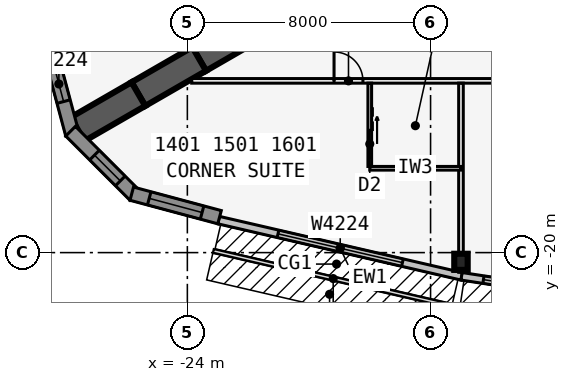
"""IFC4 building model, lengths in metres.
Left out: names, types, materials, properties, quantities, classifications, styles, units other than length and angle.
Written with IfcOpenShell. Run it as: python <this file> out.ifc"""

import sys

from ifc_helpers import new_model, si_unit, direction, frame, frame_2d, origin, origin_2d, place, context, subcontext, project, spatial, polyline, rectangle, i_section, outline, extrude, element, fill, save


model = new_model("IFC4")
c1 = context("Model", 3, precision=1e-05, world=origin(), true_north=direction((0.0, 1.0)))
c2 = subcontext(c1, "Body", "Model", "MODEL_VIEW")
j1 = project(units=[si_unit("LENGTHUNIT", "METRE"), si_unit("PLANEANGLEUNIT", "RADIAN")], contexts=[c1])
p1 = place(None, origin())
s1 = spatial("IfcSite", under=j1, at=p1, CompositionType="ELEMENT")
p2 = place(p1, origin())
s2 = spatial("IfcBuilding", under=s1, at=p2, CompositionType="ELEMENT")
p3 = place(p2, frame((0.0, 0.0, 59.1)))
s3 = spatial("IfcBuildingStorey", under=s2, at=p3, CompositionType="ELEMENT", Elevation=59.1)
for number, where, z_axis, x_axis in (
    (1, (-21.61, -12.477, 0.0), (0.0, 0.0, 1.0), (-0.866, -0.5, 0.0)),
    (2, (-23.61, -13.631, 0.0), (0.0, 0.0, 1.0), (-0.866, -0.5, 0.0)),
    (3, (-25.61, -14.786, 0.0), (0.0, 0.0, 1.0), (-0.866, -0.5, 0.0)),
):
    element("IfcWall", number, at=place(p3, frame(where, z_axis=z_axis, x_axis=x_axis)), inside=s3, PredefinedType="SHEAR", context=c2, shape_type="SweptSolid", body=[
        extrude(rectangle(XDim=2.309, YDim=0.9, at=frame_2d((1.155, 0.0))), origin(), (0.0, 0.0, 1.0), 3.4),
    ])
p4 = place(p3, frame((-15.0, -20.303, 0.0), z_axis=(0.0, 0.0, 1.0), x_axis=(1.0, 0.0, 0.0)))
e4 = element("IfcColumn", 4, at=p4, inside=s3, PredefinedType="COLUMN", context=c2, shape_type="SweptSolid", body=[
    extrude(i_section(OverallWidth=0.442, OverallDepth=0.531, WebThickness=0.066, FlangeThickness=0.106, at=origin_2d()), origin(), (0.0, 0.0, 1.0), 3.4),
])
p5 = place(p3, frame((-22.972, -18.931, 0.0), z_axis=(0.0, 0.0, 1.0), x_axis=(0.974279327392, -0.225343720163, 0.0)))
e5 = element("IfcWall", 5, at=p5, inside=s3, PredefinedType="STANDARD", context=c2, shape_type="SweptSolid", body=[
    extrude(rectangle(XDim=8.211, YDim=0.25, at=frame_2d((4.105, 0.0))), origin(), (0.0, 0.0, 1.0), 3.235),
])
p6 = place(p5, frame((2.006, 0.0, 0.45)))
e6 = element("IfcOpeningElement", 6, at=p6, cuts=e5, PredefinedType="OPENING", context=c2, shape_type="SweptSolid", body=[
    extrude(rectangle(XDim=4.2, YDim=2.4, at=frame_2d((2.1, 1.2))), frame((0.0, 0.135, 0.0), z_axis=(0.0, -1.0, 0.0), x_axis=(1.0, 0.0, 0.0)), (0.0, 0.0, 1.0), 0.27),
])
p7 = place(p3, frame((-14.981, -20.779, 0.0), z_axis=(0.0, 0.0, 1.0), x_axis=(0.988615403399, -0.150464561152, 0.0)))
e7 = element("IfcWall", 7, at=p7, inside=s3, PredefinedType="STANDARD", context=c2, shape_type="SweptSolid", body=[
    extrude(rectangle(XDim=5.058, YDim=0.25, at=frame_2d((2.529, 0.0))), origin(), (0.0, 0.0, 1.0), 3.235),
])
p8 = place(p7, frame((0.729, 0.0, 0.45)))
e8 = element("IfcOpeningElement", 8, at=p8, cuts=e7, PredefinedType="OPENING", context=c2, shape_type="SweptSolid", body=[
    extrude(rectangle(XDim=3.6, YDim=2.4, at=frame_2d((1.8, 1.2))), frame((0.0, 0.135, 0.0), z_axis=(0.0, -1.0, 0.0), x_axis=(1.0, 0.0, 0.0)), (0.0, 0.0, 1.0), 0.27),
])
p9 = place(p3, frame((-28.556, -13.221, 0.0), z_axis=(0.0, 0.0, 1.0), x_axis=(0.258801419081, -0.965930548995, 0.0)))
e9 = element("IfcWall", 9, at=p9, inside=s3, PredefinedType="SOLIDWALL", context=c2, shape_type="SweptSolid", body=[
    extrude(outline(polyline([(2.989, 0.225), (2.929, 0.225), (2.437, 0.093), (2.402, 0.225), (0.0, 0.225), (0.0, -0.225), (2.989, -0.225), (2.989, 0.225)])), origin(), (0.0, 0.0, 1.0), 3.235),
])
p10 = place(p9, frame((0.676, 0.0, 0.45)))
e10 = element("IfcOpeningElement", 10, at=p10, cuts=e9, PredefinedType="OPENING", context=c2, shape_type="SweptSolid", body=[
    extrude(rectangle(XDim=1.2, YDim=2.4, at=frame_2d((0.6, 1.2))), frame((0.0, 0.235, 0.0), z_axis=(0.0, -1.0, 0.0), x_axis=(1.0, 0.0, 0.0)), (0.0, 0.0, 1.0), 0.47),
])
p11 = place(p3, frame((-27.841, -16.007, 0.0), z_axis=(0.0, 0.0, 1.0), x_axis=(0.707025086683, -0.707188466253, 0.0)))
e11 = element("IfcWall", 11, at=p11, inside=s3, PredefinedType="SOLIDWALL", context=c2, shape_type="SweptSolid", body=[
    extrude(outline(polyline([(2.989, 0.225), (0.586, 0.225), (0.551, 0.093), (0.059, 0.225), (0.0, 0.225), (0.0, -0.225), (2.989, -0.225), (2.989, 0.225)])), origin(), (0.0, 0.0, 1.0), 3.235),
])
p12 = place(p11, frame((1.113, 0.0, 0.45)))
e12 = element("IfcOpeningElement", 12, at=p12, cuts=e11, PredefinedType="OPENING", context=c2, shape_type="SweptSolid", body=[
    extrude(rectangle(XDim=1.2, YDim=2.4, at=frame_2d((0.6, 1.2))), frame((0.0, 0.235, 0.0), z_axis=(0.0, -1.0, 0.0), x_axis=(1.0, 0.0, 0.0)), (0.0, 0.0, 1.0), 0.47),
])
p13 = place(p3, frame((-25.829, -18.062, 0.0), z_axis=(0.0, 0.0, 1.0), x_axis=(0.965930548995, -0.258801419081, 0.0)))
e13 = element("IfcWall", 13, at=p13, inside=s3, PredefinedType="SOLIDWALL", context=c2, shape_type="SweptSolid", body=[
    extrude(rectangle(XDim=2.989, YDim=0.45, at=frame_2d((1.494, 0.0))), origin(), (0.0, 0.0, 1.0), 3.235),
])
p14 = place(p13, frame((0.594, 0.0, 0.45)))
e14 = element("IfcOpeningElement", 14, at=p14, cuts=e13, PredefinedType="OPENING", context=c2, shape_type="SweptSolid", body=[
    extrude(rectangle(XDim=1.8, YDim=2.4, at=frame_2d((0.9, 1.2))), frame((0.0, 0.235, 0.0), z_axis=(0.0, -1.0, 0.0), x_axis=(1.0, 0.0, 0.0)), (0.0, 0.0, 1.0), 0.47),
])
p15 = place(p3, frame((-23.857, -14.351, 0.0), z_axis=(0.0, 0.0, 1.0), x_axis=(1.0, 0.0, 0.0)))
e15 = element("IfcWall", 15, at=p15, inside=s3, PredefinedType="PARTITIONING", context=c2, shape_type="SweptSolid", body=[
    extrude(rectangle(XDim=47.714, YDim=0.15, at=frame_2d((23.857, 0.0))), origin(), (0.0, 0.0, 1.0), 3.235),
])
p16 = place(p15, frame((4.682, 0.0, 0.0)))
e16 = element("IfcOpeningElement", 16, at=p16, cuts=e15, PredefinedType="OPENING", context=c2, shape_type="SweptSolid", body=[
    extrude(rectangle(XDim=0.95, YDim=2.13, at=frame_2d((0.475, 1.065))), frame((0.0, 0.085, 0.0), z_axis=(0.0, -1.0, 0.0), x_axis=(1.0, 0.0, 0.0)), (0.0, 0.0, 1.0), 0.17),
])
p17 = place(p15, frame((10.282, 0.0, 0.0)))
e17 = element("IfcOpeningElement", 17, at=p17, cuts=e15, PredefinedType="OPENING", context=c2, shape_type="SweptSolid", body=[
    extrude(rectangle(XDim=0.95, YDim=2.13, at=frame_2d((0.475, 1.065))), frame((0.0, 0.085, 0.0), z_axis=(0.0, -1.0, 0.0), x_axis=(1.0, 0.0, 0.0)), (0.0, 0.0, 1.0), 0.17),
])
p18 = place(p15, frame((16.482, 0.0, 0.0)))
e18 = element("IfcOpeningElement", 18, at=p18, cuts=e15, PredefinedType="OPENING", context=c2, shape_type="SweptSolid", body=[
    extrude(rectangle(XDim=0.95, YDim=2.13, at=frame_2d((0.475, 1.065))), frame((0.0, 0.085, 0.0), z_axis=(0.0, -1.0, 0.0), x_axis=(1.0, 0.0, 0.0)), (0.0, 0.0, 1.0), 0.17),
])
p19 = place(p15, frame((21.482, 0.0, 0.0)))
e19 = element("IfcOpeningElement", 19, at=p19, cuts=e15, PredefinedType="OPENING", context=c2, shape_type="SweptSolid", body=[
    extrude(rectangle(XDim=0.95, YDim=2.13, at=frame_2d((0.475, 1.065))), frame((0.0, 0.085, 0.0), z_axis=(0.0, -1.0, 0.0), x_axis=(1.0, 0.0, 0.0)), (0.0, 0.0, 1.0), 0.17),
])
p20 = place(p15, frame((25.857, 0.0, 0.0)))
e20 = element("IfcOpeningElement", 20, at=p20, cuts=e15, PredefinedType="OPENING", context=c2, shape_type="SweptSolid", body=[
    extrude(rectangle(XDim=1.0, YDim=2.13, at=frame_2d((0.5, 1.065))), frame((0.0, 0.085, 0.0), z_axis=(0.0, -1.0, 0.0), x_axis=(1.0, 0.0, 0.0)), (0.0, 0.0, 1.0), 0.17),
])
p21 = place(p15, frame((30.882, 0.0, 0.0)))
e21 = element("IfcOpeningElement", 21, at=p21, cuts=e15, PredefinedType="OPENING", context=c2, shape_type="SweptSolid", body=[
    extrude(rectangle(XDim=0.95, YDim=2.13, at=frame_2d((0.475, 1.065))), frame((0.0, 0.085, 0.0), z_axis=(0.0, -1.0, 0.0), x_axis=(1.0, 0.0, 0.0)), (0.0, 0.0, 1.0), 0.17),
])
p22 = place(p15, frame((42.082, 0.0, 0.0)))
e22 = element("IfcOpeningElement", 22, at=p22, cuts=e15, PredefinedType="OPENING", context=c2, shape_type="SweptSolid", body=[
    extrude(rectangle(XDim=0.95, YDim=2.13, at=frame_2d((0.475, 1.065))), frame((0.0, 0.085, 0.0), z_axis=(0.0, -1.0, 0.0), x_axis=(1.0, 0.0, 0.0)), (0.0, 0.0, 1.0), 0.17),
])
p23 = place(p3, frame((-15.0, -14.426, 0.0), z_axis=(0.0, 0.0, 1.0), x_axis=(0.0, -1.0, 0.0)))
e23 = element("IfcWall", 23, at=p23, inside=s3, PredefinedType="PARTITIONING", context=c2, shape_type="SweptSolid", body=[
    extrude(rectangle(XDim=6.22, YDim=0.15, at=frame_2d((3.11, 0.0))), origin(), (0.0, 0.0, 1.0), 2.389),
])
p24 = place(p3, frame((-18.0, -17.226, 0.0), z_axis=(0.0, 0.0, 1.0), x_axis=(1.0, 0.0, 0.0)))
e24 = element("IfcWall", 24, at=p24, inside=s3, PredefinedType="PLUMBINGWALL", context=c2, shape_type="SweptSolid", body=[
    extrude(rectangle(XDim=3.0, YDim=0.12, at=frame_2d((1.5, 0.0))), origin(), (0.0, 0.0, 1.0), 3.235),
])
p25 = place(p3, frame((-18.0, -14.426, 0.0), z_axis=(0.0, 0.0, 1.0), x_axis=(0.0, -1.0, 0.0)))
e25 = element("IfcWall", 25, at=p25, inside=s3, PredefinedType="PLUMBINGWALL", context=c2, shape_type="SweptSolid", body=[
    extrude(rectangle(XDim=2.74, YDim=0.12, at=frame_2d((1.37, 0.0))), origin(), (0.0, 0.0, 1.0), 3.235),
])
p26 = place(p25, frame((1.55, 0.0, 0.0)))
e26 = element("IfcOpeningElement", 26, at=p26, cuts=e25, PredefinedType="OPENING", context=c2, shape_type="SweptSolid", body=[
    extrude(rectangle(XDim=0.9, YDim=2.13, at=frame_2d((0.45, 1.065))), frame((0.0, 0.07, 0.0), z_axis=(0.0, -1.0, 0.0), x_axis=(1.0, 0.0, 0.0)), (0.0, 0.0, 1.0), 0.14),
])
p27 = place(p6, origin())
e27 = element("IfcWindow", 27, at=p27, inside=s3, PartitioningType="SINGLE_PANEL", PredefinedType="WINDOW", context=c2, shape_type="SweptSolid", body=[
    extrude(rectangle(XDim=4.2, YDim=2.4, at=frame_2d((2.1, 1.2))), frame((0.0, 0.03, 0.0), z_axis=(0.0, -1.0, 0.0), x_axis=(1.0, 0.0, 0.0)), (0.0, 0.0, 1.0), 0.06),
])
fill(e6, e27)
p28 = place(p8, origin())
e28 = element("IfcWindow", 28, at=p28, inside=s3, PartitioningType="SINGLE_PANEL", PredefinedType="WINDOW", context=c2, shape_type="SweptSolid", body=[
    extrude(rectangle(XDim=3.6, YDim=2.4, at=frame_2d((1.8, 1.2))), frame((0.0, 0.03, 0.0), z_axis=(0.0, -1.0, 0.0), x_axis=(1.0, 0.0, 0.0)), (0.0, 0.0, 1.0), 0.06),
])
fill(e8, e28)
p29 = place(p10, origin())
e29 = element("IfcWindow", 29, at=p29, inside=s3, PartitioningType="SINGLE_PANEL", PredefinedType="WINDOW", context=c2, shape_type="SweptSolid", body=[
    extrude(rectangle(XDim=1.2, YDim=2.4, at=frame_2d((0.6, 1.2))), frame((0.0, 0.03, 0.0), z_axis=(0.0, -1.0, 0.0), x_axis=(1.0, 0.0, 0.0)), (0.0, 0.0, 1.0), 0.06),
])
fill(e10, e29)
p30 = place(p12, origin())
e30 = element("IfcWindow", 30, at=p30, inside=s3, PartitioningType="SINGLE_PANEL", PredefinedType="WINDOW", context=c2, shape_type="SweptSolid", body=[
    extrude(rectangle(XDim=1.2, YDim=2.4, at=frame_2d((0.6, 1.2))), frame((0.0, 0.03, 0.0), z_axis=(0.0, -1.0, 0.0), x_axis=(1.0, 0.0, 0.0)), (0.0, 0.0, 1.0), 0.06),
])
fill(e12, e30)
p31 = place(p14, origin())
e31 = element("IfcWindow", 31, at=p31, inside=s3, PartitioningType="SINGLE_PANEL", PredefinedType="WINDOW", context=c2, shape_type="SweptSolid", body=[
    extrude(rectangle(XDim=1.8, YDim=2.4, at=frame_2d((0.9, 1.2))), frame((0.0, 0.03, 0.0), z_axis=(0.0, -1.0, 0.0), x_axis=(1.0, 0.0, 0.0)), (0.0, 0.0, 1.0), 0.06),
])
fill(e14, e31)
p32 = place(p26, origin())
e32 = element("IfcDoor", 32, at=p32, inside=s3, OperationType="SLIDING_TO_LEFT", PredefinedType="DOOR", context=c2, shape_type="SweptSolid", body=[
    extrude(rectangle(XDim=0.9, YDim=2.13, at=frame_2d((0.45, 1.065))), frame((0.0, 0.025, 0.0), z_axis=(0.0, -1.0, 0.0), x_axis=(1.0, 0.0, 0.0)), (0.0, 0.0, 1.0), 0.05),
])
fill(e26, e32)
p33 = place(p16, origin())
e33 = element("IfcDoor", 33, at=p33, inside=s3, OperationType="SINGLE_SWING_LEFT", PredefinedType="DOOR", context=c2, shape_type="SweptSolid", body=[
    extrude(rectangle(XDim=0.95, YDim=2.13, at=frame_2d((0.475, 1.065))), frame((0.0, 0.025, 0.0), z_axis=(0.0, -1.0, 0.0), x_axis=(1.0, 0.0, 0.0)), (0.0, 0.0, 1.0), 0.05),
])
fill(e16, e33)
save(model, sys.argv[1])
